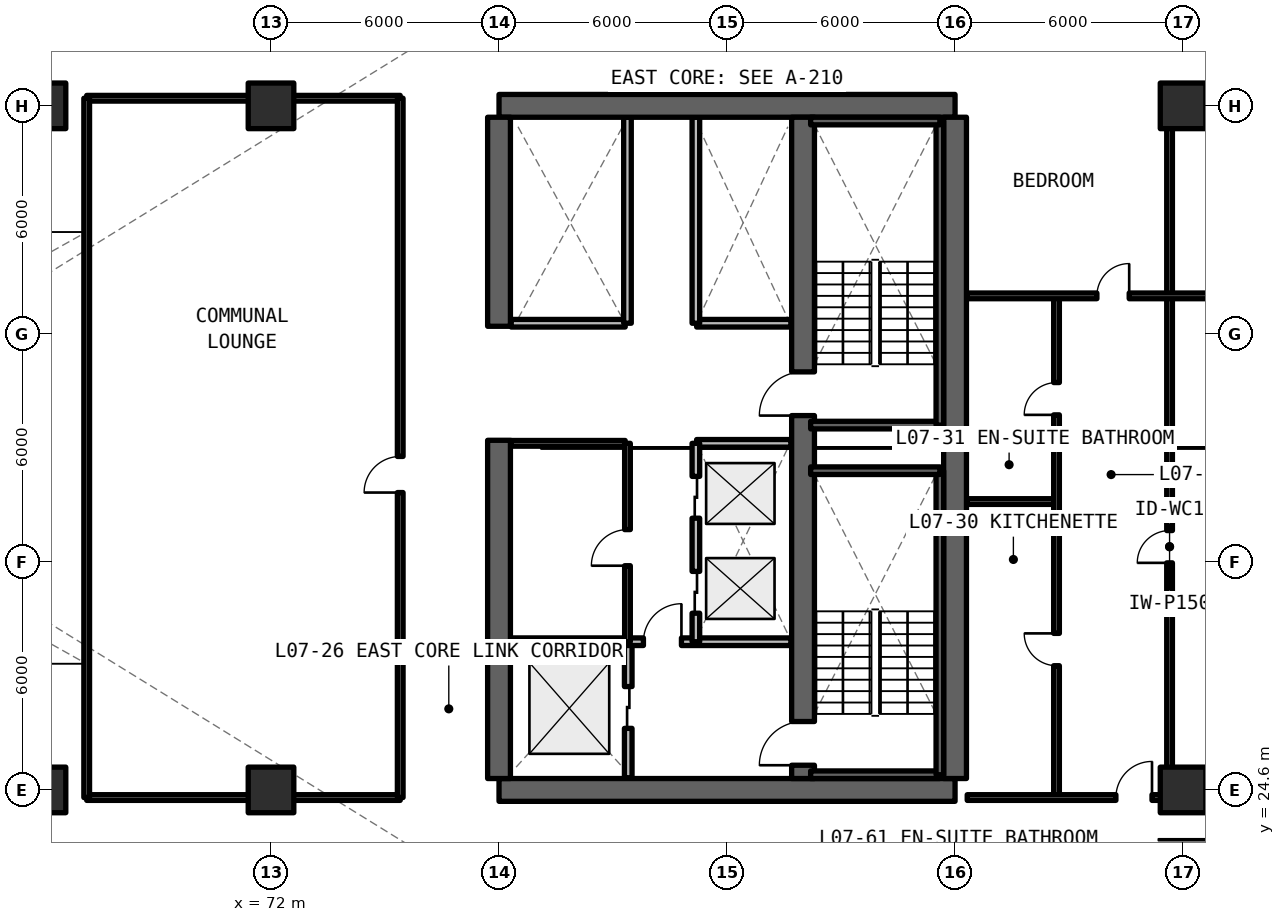
"""IFC4 building model, lengths in metres.
Left out: names, types, materials, properties, quantities, classifications, styles, units other than length and angle.
Written with IfcOpenShell. Run it as: python <this file> out.ifc"""

import sys

from ifc_helpers import new_model, si_unit, direction, frame, frame_2d, origin, origin_2d, place, context, subcontext, project, spatial, rectangle, extrude, element, fill, save


model = new_model("IFC4")
c1 = context("Model", 3, precision=1e-05, world=origin(), true_north=direction((0.0, 1.0)))
c2 = subcontext(c1, "Body", "Model", "MODEL_VIEW")
j1 = project(units=[si_unit("LENGTHUNIT", "METRE"), si_unit("PLANEANGLEUNIT", "RADIAN")], contexts=[c1])
p1 = place(None, origin())
s1 = spatial("IfcSite", under=j1, at=p1, CompositionType="ELEMENT")
p2 = place(p1, origin())
s2 = spatial("IfcBuilding", under=s1, at=p2, CompositionType="ELEMENT")
p3 = place(p2, frame((0.0, 0.0, 29.04)))
s3 = spatial("IfcBuildingStorey", under=s2, at=p3, CompositionType="ELEMENT", Elevation=29.04)
for number, where, z_axis, x_axis in (
    (1, (78.0, 24.6, 0.0), (0.0, 0.0, 1.0), (1.0, 0.0, 0.0)),
    (2, (90.0, 42.6, 0.0), (0.0, 0.0, 1.0), (-1.0, 0.0, 0.0)),
):
    element("IfcWall", number, at=place(p3, frame(where, z_axis=z_axis, x_axis=x_axis)), inside=s3, PredefinedType="SHEAR", context=c2, shape_type="SweptSolid", body=[
        extrude(rectangle(XDim=12.0, YDim=0.6, at=frame_2d((6.0, 0.0))), origin(), (0.0, 0.0, 1.0), 3.3),
    ])
p4 = place(p3, frame((90.0, 24.9, 0.0), z_axis=(0.0, 0.0, 1.0), x_axis=(0.0, 1.0, 0.0)))
e3 = element("IfcWall", 3, at=p4, inside=s3, PredefinedType="SHEAR", context=c2, shape_type="SweptSolid", body=[
    extrude(rectangle(XDim=17.4, YDim=0.6, at=frame_2d((8.7, 0.0))), origin(), (0.0, 0.0, 1.0), 3.3),
])
p5 = place(p3, frame((78.0, 24.9, 0.0), z_axis=(0.0, 0.0, 1.0), x_axis=(0.0, 1.0, 0.0)))
e4 = element("IfcWall", 4, at=p5, inside=s3, PredefinedType="SHEAR", context=c2, shape_type="SweptSolid", body=[
    extrude(rectangle(XDim=8.9, YDim=0.6, at=frame_2d((4.45, 0.0))), origin(), (0.0, 0.0, 1.0), 3.3),
])
p6 = place(p3, frame((78.0, 36.8, 0.0), z_axis=(0.0, 0.0, 1.0), x_axis=(0.0, 1.0, 0.0)))
e5 = element("IfcWall", 5, at=p6, inside=s3, PredefinedType="SHEAR", context=c2, shape_type="SweptSolid", body=[
    extrude(rectangle(XDim=5.5, YDim=0.6, at=frame_2d((2.75, 0.0))), origin(), (0.0, 0.0, 1.0), 3.3),
])
p7 = place(p3, frame((86.0, 24.9, 0.0), z_axis=(0.0, 0.0, 1.0), x_axis=(0.0, 1.0, 0.0)))
e6 = element("IfcWall", 6, at=p7, inside=s3, PredefinedType="SHEAR", context=c2, shape_type="SweptSolid", body=[
    extrude(rectangle(XDim=17.4, YDim=0.6, at=frame_2d((8.7, 0.0))), origin(), (0.0, 0.0, 1.0), 3.3),
])
p8 = place(p7, frame((0.35, 0.0, 0.0)))
e7 = element("IfcOpeningElement", 7, at=p8, cuts=e6, PredefinedType="OPENING", context=c2, shape_type="SweptSolid", body=[
    extrude(rectangle(XDim=1.15, YDim=2.15, at=frame_2d((0.575, 1.075))), frame((0.0, 0.31, 0.0), z_axis=(0.0, -1.0, 0.0), x_axis=(1.0, 0.0, 0.0)), (0.0, 0.0, 1.0), 0.62),
])
p9 = place(p7, frame((9.55, 0.0, 0.0)))
e8 = element("IfcOpeningElement", 8, at=p9, cuts=e6, PredefinedType="OPENING", context=c2, shape_type="SweptSolid", body=[
    extrude(rectangle(XDim=1.15, YDim=2.15, at=frame_2d((0.575, 1.075))), frame((0.0, 0.31, 0.0), z_axis=(0.0, -1.0, 0.0), x_axis=(1.0, 0.0, 0.0)), (0.0, 0.0, 1.0), 0.62),
])
for number, where, z_axis, x_axis in (
    (9, (66.0, 24.6, -0.24), (0.0, 0.0, 1.0), (1.0, 0.0, 0.0)),
    (10, (66.0, 42.6, -0.24), (0.0, 0.0, 1.0), (1.0, 0.0, 0.0)),
    (11, (72.0, 24.6, -0.24), (0.0, 0.0, 1.0), (1.0, 0.0, 0.0)),
    (12, (72.0, 42.6, -0.24), (0.0, 0.0, 1.0), (1.0, 0.0, 0.0)),
    (13, (96.0, 24.6, -0.24), (0.0, 0.0, 1.0), (1.0, 0.0, 0.0)),
    (14, (96.0, 42.6, -0.24), (0.0, 0.0, 1.0), (1.0, 0.0, 0.0)),
):
    element("IfcColumn", number, at=place(p3, frame(where, z_axis=z_axis, x_axis=x_axis)), inside=s3, PredefinedType="COLUMN", context=c2, shape_type="SweptSolid", body=[
        extrude(rectangle(XDim=1.2, YDim=1.2, at=origin_2d()), origin(), (0.0, 0.0, 1.0), 3.54),
    ])
p10 = place(p3, frame((81.4, 24.92, 0.0), z_axis=(0.0, 0.0, 1.0), x_axis=(0.0, 1.0, 0.0)))
e15 = element("IfcWall", 15, at=p10, inside=s3, PredefinedType="SOLIDWALL", context=c2, shape_type="SweptSolid", body=[
    extrude(rectangle(XDim=3.58, YDim=0.2, at=frame_2d((1.79, 0.0))), origin(), (0.0, 0.0, 1.0), 2.35),
])
p11 = place(p10, frame((1.3, 0.0, 0.0)))
e16 = element("IfcOpeningElement", 16, at=p11, cuts=e15, PredefinedType="OPENING", context=c2, shape_type="SweptSolid", body=[
    extrude(rectangle(XDim=1.1, YDim=2.2, at=frame_2d((0.55, 1.1))), frame((0.0, 0.11, 0.0), z_axis=(0.0, -1.0, 0.0), x_axis=(1.0, 0.0, 0.0)), (0.0, 0.0, 1.0), 0.22),
])
p12 = place(p3, frame((78.32, 28.5, 0.0), z_axis=(0.0, 0.0, 1.0), x_axis=(1.0, 0.0, 0.0)))
e17 = element("IfcWall", 17, at=p12, inside=s3, PredefinedType="SOLIDWALL", context=c2, shape_type="SweptSolid", body=[
    extrude(rectangle(XDim=7.36, YDim=0.2, at=frame_2d((3.68, 0.0))), origin(), (0.0, 0.0, 1.0), 2.35),
])
p13 = place(p12, frame((3.48, 0.0, 0.0)))
e18 = element("IfcOpeningElement", 18, at=p13, cuts=e17, PredefinedType="OPENING", context=c2, shape_type="SweptSolid", body=[
    extrude(rectangle(XDim=1.0, YDim=2.15, at=frame_2d((0.5, 1.075))), frame((0.0, 0.11, 0.0), z_axis=(0.0, -1.0, 0.0), x_axis=(1.0, 0.0, 0.0)), (0.0, 0.0, 1.0), 0.22),
])
p14 = place(p3, frame((83.2, 33.72, 0.0), z_axis=(0.0, 0.0, 1.0), x_axis=(1.0, 0.0, 0.0)))
e19 = element("IfcWall", 19, at=p14, inside=s3, PredefinedType="SOLIDWALL", context=c2, shape_type="SweptSolid", body=[
    extrude(rectangle(XDim=2.48, YDim=0.2, at=frame_2d((1.24, 0.0))), origin(), (0.0, 0.0, 1.0), 2.35),
])
p15 = place(p3, frame((83.18, 28.5, 0.0), z_axis=(0.0, 0.0, 1.0), x_axis=(0.0, 1.0, 0.0)))
e20 = element("IfcWall", 20, at=p15, inside=s3, PredefinedType="SOLIDWALL", context=c2, shape_type="SweptSolid", body=[
    extrude(rectangle(XDim=5.22, YDim=0.2, at=frame_2d((2.61, 0.0))), origin(), (0.0, 0.0, 1.0), 2.35),
])
p16 = place(p15, frame((0.75, 0.0, 0.0)))
e21 = element("IfcOpeningElement", 21, at=p16, cuts=e20, PredefinedType="OPENING", context=c2, shape_type="SweptSolid", body=[
    extrude(rectangle(XDim=1.1, YDim=2.2, at=frame_2d((0.55, 1.1))), frame((0.0, 0.11, 0.0), z_axis=(0.0, -1.0, 0.0), x_axis=(1.0, 0.0, 0.0)), (0.0, 0.0, 1.0), 0.22),
])
p17 = place(p15, frame((3.25, 0.0, 0.0)))
e22 = element("IfcOpeningElement", 22, at=p17, cuts=e20, PredefinedType="OPENING", context=c2, shape_type="SweptSolid", body=[
    extrude(rectangle(XDim=1.1, YDim=2.2, at=frame_2d((0.55, 1.1))), frame((0.0, 0.11, 0.0), z_axis=(0.0, -1.0, 0.0), x_axis=(1.0, 0.0, 0.0)), (0.0, 0.0, 1.0), 0.22),
])
p18 = place(p3, frame((78.32, 33.72, 0.0), z_axis=(0.0, 0.0, 1.0), x_axis=(1.0, 0.0, 0.0)))
e23 = element("IfcWall", 23, at=p18, inside=s3, PredefinedType="SOLIDWALL", context=c2, shape_type="SweptSolid", body=[
    extrude(rectangle(XDim=3.0, YDim=0.15, at=frame_2d((1.5, 0.0))), origin(), (0.0, 0.0, 1.0), 2.35),
])
p19 = place(p3, frame((81.38, 28.5, 0.0), z_axis=(0.0, 0.0, 1.0), x_axis=(0.0, 1.0, 0.0)))
e24 = element("IfcWall", 24, at=p19, inside=s3, PredefinedType="SOLIDWALL", context=c2, shape_type="SweptSolid", body=[
    extrude(rectangle(XDim=5.22, YDim=0.15, at=frame_2d((2.61, 0.0))), origin(), (0.0, 0.0, 1.0), 2.35),
])
p20 = place(p19, frame((2.0, 0.0, 0.0)))
e25 = element("IfcOpeningElement", 25, at=p20, cuts=e24, PredefinedType="OPENING", context=c2, shape_type="SweptSolid", body=[
    extrude(rectangle(XDim=0.95, YDim=2.15, at=frame_2d((0.475, 1.075))), frame((0.0, 0.085, 0.0), z_axis=(0.0, -1.0, 0.0), x_axis=(1.0, 0.0, 0.0)), (0.0, 0.0, 1.0), 0.17),
])
p21 = place(p3, frame((83.2, 36.88, 0.0), z_axis=(0.0, 0.0, 1.0), x_axis=(1.0, 0.0, 0.0)))
e26 = element("IfcWall", 26, at=p21, inside=s3, PredefinedType="SOLIDWALL", context=c2, shape_type="SweptSolid", body=[
    extrude(rectangle(XDim=2.48, YDim=0.2, at=frame_2d((1.24, 0.0))), origin(), (0.0, 0.0, 1.0), 2.35),
])
p22 = place(p3, frame((83.18, 36.88, 0.0), z_axis=(0.0, 0.0, 1.0), x_axis=(0.0, 1.0, 0.0)))
e27 = element("IfcWall", 27, at=p22, inside=s3, PredefinedType="SOLIDWALL", context=c2, shape_type="SweptSolid", body=[
    extrude(rectangle(XDim=5.42, YDim=0.2, at=frame_2d((2.71, 0.0))), origin(), (0.0, 0.0, 1.0), 2.35),
])
p23 = place(p3, frame((78.32, 36.88, 0.0), z_axis=(0.0, 0.0, 1.0), x_axis=(1.0, 0.0, 0.0)))
e28 = element("IfcWall", 28, at=p23, inside=s3, PredefinedType="SOLIDWALL", context=c2, shape_type="SweptSolid", body=[
    extrude(rectangle(XDim=3.0, YDim=0.2, at=frame_2d((1.5, 0.0))), origin(), (0.0, 0.0, 1.0), 2.35),
])
p24 = place(p3, frame((81.38, 36.88, 0.0), z_axis=(0.0, 0.0, 1.0), x_axis=(0.0, 1.0, 0.0)))
e29 = element("IfcWall", 29, at=p24, inside=s3, PredefinedType="SOLIDWALL", context=c2, shape_type="SweptSolid", body=[
    extrude(rectangle(XDim=5.42, YDim=0.2, at=frame_2d((2.71, 0.0))), origin(), (0.0, 0.0, 1.0), 2.35),
])
for number, where, z_axis, x_axis in (
    (30, (67.15, 24.4, 0.0), (0.0, 0.0, 1.0), (1.0, 0.0, 0.0)),
    (31, (67.15, 42.8, 0.0), (0.0, 0.0, 1.0), (1.0, 0.0, 0.0)),
):
    element("IfcWall", number, at=place(p3, frame(where, z_axis=z_axis, x_axis=x_axis)), inside=s3, PredefinedType="SOLIDWALL", context=c2, shape_type="SweptSolid", body=[
        extrude(rectangle(XDim=8.25, YDim=0.15, at=frame_2d((4.125, 0.0))), origin(), (0.0, 0.0, 1.0), 2.295),
    ])
p25 = place(p3, frame((67.15, 24.4, 0.0), z_axis=(0.0, 0.0, 1.0), x_axis=(0.0, 1.0, 0.0)))
e32 = element("IfcWall", 32, at=p25, inside=s3, PredefinedType="SOLIDWALL", context=c2, shape_type="SweptSolid", body=[
    extrude(rectangle(XDim=18.4, YDim=0.15, at=frame_2d((9.2, 0.0))), origin(), (0.0, 0.0, 1.0), 2.35),
])
p26 = place(p3, frame((75.4, 24.4, 0.0), z_axis=(0.0, 0.0, 1.0), x_axis=(0.0, 1.0, 0.0)))
e33 = element("IfcWall", 33, at=p26, inside=s3, PredefinedType="SOLIDWALL", context=c2, shape_type="SweptSolid", body=[
    extrude(rectangle(XDim=18.4, YDim=0.15, at=frame_2d((9.2, 0.0))), origin(), (0.0, 0.0, 1.0), 2.35),
])
p27 = place(p26, frame((8.025, 0.0, 0.0)))
e34 = element("IfcOpeningElement", 34, at=p27, cuts=e33, PredefinedType="OPENING", context=c2, shape_type="SweptSolid", body=[
    extrude(rectangle(XDim=0.95, YDim=2.15, at=frame_2d((0.475, 1.075))), frame((0.0, 0.085, 0.0), z_axis=(0.0, -1.0, 0.0), x_axis=(1.0, 0.0, 0.0)), (0.0, 0.0, 1.0), 0.17),
])
p28 = place(p3, frame((95.645, 24.4, 0.0), z_axis=(0.0, 0.0, 1.0), x_axis=(0.0, 1.0, 0.0)))
e35 = element("IfcWall", 35, at=p28, inside=s3, PredefinedType="PARTITIONING", context=c2, shape_type="SweptSolid", body=[
    extrude(rectangle(XDim=13.2, YDim=0.15, at=frame_2d((6.6, 0.0))), origin(), (0.0, 0.0, 1.0), 2.35),
])
p29 = place(p28, frame((6.175, 0.0, 0.0)))
e36 = element("IfcOpeningElement", 36, at=p29, cuts=e35, PredefinedType="OPENING", context=c2, shape_type="SweptSolid", body=[
    extrude(rectangle(XDim=0.85, YDim=2.1, at=frame_2d((0.425, 1.05))), frame((0.0, 0.085, 0.0), z_axis=(0.0, -1.0, 0.0), x_axis=(1.0, 0.0, 0.0)), (0.0, 0.0, 1.0), 0.17),
])
p30 = place(p3, frame((90.32, 32.188, 0.0), z_axis=(0.0, 0.0, 1.0), x_axis=(1.0, 0.0, 0.0)))
e37 = element("IfcWall", 37, at=p30, inside=s3, PredefinedType="PARTITIONING", context=c2, shape_type="SweptSolid", body=[
    extrude(rectangle(XDim=2.35, YDim=0.15, at=frame_2d((1.175, 0.0))), origin(), (0.0, 0.0, 1.0), 2.35),
])
p31 = place(p3, frame((92.67, 24.4, 0.0), z_axis=(0.0, 0.0, 1.0), x_axis=(0.0, 1.0, 0.0)))
e38 = element("IfcWall", 38, at=p31, inside=s3, PredefinedType="PARTITIONING", context=c2, shape_type="SweptSolid", body=[
    extrude(rectangle(XDim=13.2, YDim=0.15, at=frame_2d((6.6, 0.0))), origin(), (0.0, 0.0, 1.0), 2.35),
])
p32 = place(p31, frame((3.469, 0.0, 0.0)))
e39 = element("IfcOpeningElement", 39, at=p32, cuts=e38, PredefinedType="OPENING", context=c2, shape_type="SweptSolid", body=[
    extrude(rectangle(XDim=0.85, YDim=2.1, at=frame_2d((0.425, 1.05))), frame((0.0, 0.085, 0.0), z_axis=(0.0, -1.0, 0.0), x_axis=(1.0, 0.0, 0.0)), (0.0, 0.0, 1.0), 0.17),
])
p33 = place(p31, frame((10.069, 0.0, 0.0)))
e40 = element("IfcOpeningElement", 40, at=p33, cuts=e38, PredefinedType="OPENING", context=c2, shape_type="SweptSolid", body=[
    extrude(rectangle(XDim=0.85, YDim=2.1, at=frame_2d((0.425, 1.05))), frame((0.0, 0.085, 0.0), z_axis=(0.0, -1.0, 0.0), x_axis=(1.0, 0.0, 0.0)), (0.0, 0.0, 1.0), 0.17),
])
p34 = place(p3, frame((95.645, 37.6, 0.0), z_axis=(0.0, 0.0, 1.0), x_axis=(0.0, 1.0, 0.0)))
e41 = element("IfcWall", 41, at=p34, inside=s3, PredefinedType="PARTITIONING", context=c2, shape_type="SweptSolid", body=[
    extrude(rectangle(XDim=5.2, YDim=0.15, at=frame_2d((2.6, 0.0))), origin(), (0.0, 0.0, 1.0), 2.35),
])
p35 = place(p3, frame((90.32, 37.6, 0.0), z_axis=(0.0, 0.0, 1.0), x_axis=(1.0, 0.0, 0.0)))
e42 = element("IfcWall", 42, at=p35, inside=s3, PredefinedType="PARTITIONING", context=c2, shape_type="SweptSolid", body=[
    extrude(rectangle(XDim=10.24, YDim=0.15, at=frame_2d((5.12, 0.0))), origin(), (0.0, 0.0, 1.0), 2.35),
])
p36 = place(p35, frame((3.412, 0.0, 0.0)))
e43 = element("IfcOpeningElement", 43, at=p36, cuts=e42, PredefinedType="OPENING", context=c2, shape_type="SweptSolid", body=[
    extrude(rectangle(XDim=0.85, YDim=2.1, at=frame_2d((0.425, 1.05))), frame((0.0, 0.085, 0.0), z_axis=(0.0, -1.0, 0.0), x_axis=(1.0, 0.0, 0.0)), (0.0, 0.0, 1.0), 0.17),
])
p37 = place(p35, frame((7.357, 0.0, 0.0)))
e44 = element("IfcOpeningElement", 44, at=p37, cuts=e42, PredefinedType="OPENING", context=c2, shape_type="SweptSolid", body=[
    extrude(rectangle(XDim=0.85, YDim=2.1, at=frame_2d((0.425, 1.05))), frame((0.0, 0.085, 0.0), z_axis=(0.0, -1.0, 0.0), x_axis=(1.0, 0.0, 0.0)), (0.0, 0.0, 1.0), 0.17),
])
p38 = place(p3, frame((90.32, 24.4, 0.0), z_axis=(0.0, 0.0, 1.0), x_axis=(1.0, 0.0, 0.0)))
e45 = element("IfcWall", 45, at=p38, inside=s3, PredefinedType="SOLIDWALL", context=c2, shape_type="SweptSolid", body=[
    extrude(rectangle(XDim=10.24, YDim=0.15, at=frame_2d((5.12, 0.0))), origin(), (0.0, 0.0, 1.0), 2.295),
])
p39 = place(p38, frame((3.913, 0.0, 0.0)))
e46 = element("IfcOpeningElement", 46, at=p39, cuts=e45, PredefinedType="OPENING", context=c2, shape_type="SweptSolid", body=[
    extrude(rectangle(XDim=0.95, YDim=2.15, at=frame_2d((0.475, 1.075))), frame((0.0, 0.085, 0.0), z_axis=(0.0, -1.0, 0.0), x_axis=(1.0, 0.0, 0.0)), (0.0, 0.0, 1.0), 0.17),
])
p40 = place(p3, frame((86.2, 25.0, 0.0), z_axis=(0.0, 0.0, 1.0), x_axis=(1.0, 0.0, 0.0)))
e47 = element("IfcWall", 47, at=p40, inside=s3, PredefinedType="SOLIDWALL", context=c2, shape_type="SweptSolid", body=[
    extrude(rectangle(XDim=3.4, YDim=0.2, at=frame_2d((1.7, 0.0))), origin(), (0.0, 0.0, 1.0), 3.3),
])
p41 = place(p3, frame((89.6, 25.0, 0.0), z_axis=(0.0, 0.0, 1.0), x_axis=(0.0, 1.0, 0.0)))
e48 = element("IfcWall", 48, at=p41, inside=s3, PredefinedType="SOLIDWALL", context=c2, shape_type="SweptSolid", body=[
    extrude(rectangle(XDim=8.0, YDim=0.2, at=frame_2d((4.0, 0.0))), origin(), (0.0, 0.0, 1.0), 3.3),
])
for number, where, z_axis, x_axis in (
    (49, (89.6, 33.0, 0.0), (0.0, 0.0, 1.0), (-1.0, 0.0, 0.0)),
    (50, (86.2, 34.2, 0.0), (0.0, 0.0, 1.0), (1.0, 0.0, 0.0)),
):
    element("IfcWall", number, at=place(p3, frame(where, z_axis=z_axis, x_axis=x_axis)), inside=s3, PredefinedType="SOLIDWALL", context=c2, shape_type="SweptSolid", body=[
        extrude(rectangle(XDim=3.4, YDim=0.2, at=frame_2d((1.7, 0.0))), origin(), (0.0, 0.0, 1.0), 3.3),
    ])
p42 = place(p3, frame((89.6, 34.2, 0.0), z_axis=(0.0, 0.0, 1.0), x_axis=(0.0, 1.0, 0.0)))
e51 = element("IfcWall", 51, at=p42, inside=s3, PredefinedType="SOLIDWALL", context=c2, shape_type="SweptSolid", body=[
    extrude(rectangle(XDim=8.0, YDim=0.2, at=frame_2d((4.0, 0.0))), origin(), (0.0, 0.0, 1.0), 3.3),
])
p43 = place(p3, frame((89.6, 42.2, 0.0), z_axis=(0.0, 0.0, 1.0), x_axis=(-1.0, 0.0, 0.0)))
e52 = element("IfcWall", 52, at=p43, inside=s3, PredefinedType="SOLIDWALL", context=c2, shape_type="SweptSolid", body=[
    extrude(rectangle(XDim=3.4, YDim=0.2, at=frame_2d((1.7, 0.0))), origin(), (0.0, 0.0, 1.0), 3.3),
])
p44 = place(p11, origin())
e53 = element("IfcDoor", 53, at=p44, inside=s3, OperationType="SLIDING_TO_LEFT", PredefinedType="DOOR", context=c2, shape_type="SweptSolid", body=[
    extrude(rectangle(XDim=1.1, YDim=2.2, at=frame_2d((0.55, 1.1))), frame((0.0, 0.025, 0.0), z_axis=(0.0, -1.0, 0.0), x_axis=(1.0, 0.0, 0.0)), (0.0, 0.0, 1.0), 0.05),
])
fill(e16, e53)
p45 = place(p13, origin())
e54 = element("IfcDoor", 54, at=p45, inside=s3, OperationType="SINGLE_SWING_RIGHT", PredefinedType="DOOR", context=c2, shape_type="SweptSolid", body=[
    extrude(rectangle(XDim=1.0, YDim=2.15, at=frame_2d((0.5, 1.075))), frame((0.0, 0.025, 0.0), z_axis=(0.0, -1.0, 0.0), x_axis=(1.0, 0.0, 0.0)), (0.0, 0.0, 1.0), 0.05),
])
fill(e18, e54)
p46 = place(p16, origin())
e55 = element("IfcDoor", 55, at=p46, inside=s3, OperationType="SLIDING_TO_LEFT", PredefinedType="DOOR", context=c2, shape_type="SweptSolid", body=[
    extrude(rectangle(XDim=1.1, YDim=2.2, at=frame_2d((0.55, 1.1))), frame((0.0, 0.025, 0.0), z_axis=(0.0, -1.0, 0.0), x_axis=(1.0, 0.0, 0.0)), (0.0, 0.0, 1.0), 0.05),
])
fill(e21, e55)
p47 = place(p17, origin())
e56 = element("IfcDoor", 56, at=p47, inside=s3, OperationType="SLIDING_TO_RIGHT", PredefinedType="DOOR", context=c2, shape_type="SweptSolid", body=[
    extrude(rectangle(XDim=1.1, YDim=2.2, at=frame_2d((0.55, 1.1))), frame((0.0, 0.025, 0.0), z_axis=(0.0, -1.0, 0.0), x_axis=(1.0, 0.0, 0.0)), (0.0, 0.0, 1.0), 0.05),
])
fill(e22, e56)
p48 = place(p20, origin())
e57 = element("IfcDoor", 57, at=p48, inside=s3, OperationType="SINGLE_SWING_LEFT", PredefinedType="DOOR", context=c2, shape_type="SweptSolid", body=[
    extrude(rectangle(XDim=0.95, YDim=2.15, at=frame_2d((0.475, 1.075))), frame((0.0, 0.025, 0.0), z_axis=(0.0, -1.0, 0.0), x_axis=(1.0, 0.0, 0.0)), (0.0, 0.0, 1.0), 0.05),
])
fill(e25, e57)
p49 = place(p27, origin())
e58 = element("IfcDoor", 58, at=p49, inside=s3, OperationType="SINGLE_SWING_LEFT", PredefinedType="DOOR", context=c2, shape_type="SweptSolid", body=[
    extrude(rectangle(XDim=0.95, YDim=2.15, at=frame_2d((0.475, 1.075))), frame((0.0, 0.025, 0.0), z_axis=(0.0, -1.0, 0.0), x_axis=(1.0, 0.0, 0.0)), (0.0, 0.0, 1.0), 0.05),
])
fill(e34, e58)
p50 = place(p29, origin())
e59 = element("IfcDoor", 59, at=p50, inside=s3, OperationType="SINGLE_SWING_LEFT", PredefinedType="DOOR", context=c2, shape_type="SweptSolid", body=[
    extrude(rectangle(XDim=0.85, YDim=2.1, at=frame_2d((0.425, 1.05))), frame((0.0, 0.025, 0.0), z_axis=(0.0, -1.0, 0.0), x_axis=(1.0, 0.0, 0.0)), (0.0, 0.0, 1.0), 0.05),
])
fill(e36, e59)
p51 = place(p32, origin())
e60 = element("IfcDoor", 60, at=p51, inside=s3, OperationType="SINGLE_SWING_RIGHT", PredefinedType="DOOR", context=c2, shape_type="SweptSolid", body=[
    extrude(rectangle(XDim=0.85, YDim=2.1, at=frame_2d((0.425, 1.05))), frame((0.0, 0.025, 0.0), z_axis=(0.0, -1.0, 0.0), x_axis=(1.0, 0.0, 0.0)), (0.0, 0.0, 1.0), 0.05),
])
fill(e39, e60)
p52 = place(p33, origin())
e61 = element("IfcDoor", 61, at=p52, inside=s3, OperationType="SINGLE_SWING_LEFT", PredefinedType="DOOR", context=c2, shape_type="SweptSolid", body=[
    extrude(rectangle(XDim=0.85, YDim=2.1, at=frame_2d((0.425, 1.05))), frame((0.0, 0.025, 0.0), z_axis=(0.0, -1.0, 0.0), x_axis=(1.0, 0.0, 0.0)), (0.0, 0.0, 1.0), 0.05),
])
fill(e40, e61)
p53 = place(p36, origin())
e62 = element("IfcDoor", 62, at=p53, inside=s3, OperationType="SINGLE_SWING_RIGHT", PredefinedType="DOOR", context=c2, shape_type="SweptSolid", body=[
    extrude(rectangle(XDim=0.85, YDim=2.1, at=frame_2d((0.425, 1.05))), frame((0.0, 0.025, 0.0), z_axis=(0.0, -1.0, 0.0), x_axis=(1.0, 0.0, 0.0)), (0.0, 0.0, 1.0), 0.05),
])
fill(e43, e62)
p54 = place(p39, origin())
e63 = element("IfcDoor", 63, at=p54, inside=s3, OperationType="SINGLE_SWING_RIGHT", PredefinedType="DOOR", context=c2, shape_type="SweptSolid", body=[
    extrude(rectangle(XDim=0.95, YDim=2.15, at=frame_2d((0.475, 1.075))), frame((0.0, 0.025, 0.0), z_axis=(0.0, -1.0, 0.0), x_axis=(1.0, 0.0, 0.0)), (0.0, 0.0, 1.0), 0.05),
])
fill(e46, e63)
p55 = place(p8, origin())
e64 = element("IfcDoor", 64, at=p55, inside=s3, OperationType="SINGLE_SWING_LEFT", PredefinedType="DOOR", context=c2, shape_type="SweptSolid", body=[
    extrude(rectangle(XDim=1.15, YDim=2.15, at=frame_2d((0.575, 1.075))), frame((0.0, 0.025, 0.0), z_axis=(0.0, -1.0, 0.0), x_axis=(1.0, 0.0, 0.0)), (0.0, 0.0, 1.0), 0.05),
])
fill(e7, e64)
p56 = place(p9, origin())
e65 = element("IfcDoor", 65, at=p56, inside=s3, OperationType="SINGLE_SWING_RIGHT", PredefinedType="DOOR", context=c2, shape_type="SweptSolid", body=[
    extrude(rectangle(XDim=1.15, YDim=2.15, at=frame_2d((0.575, 1.075))), frame((0.0, 0.025, 0.0), z_axis=(0.0, -1.0, 0.0), x_axis=(1.0, 0.0, 0.0)), (0.0, 0.0, 1.0), 0.05),
])
fill(e8, e65)
save(model, sys.argv[1])
